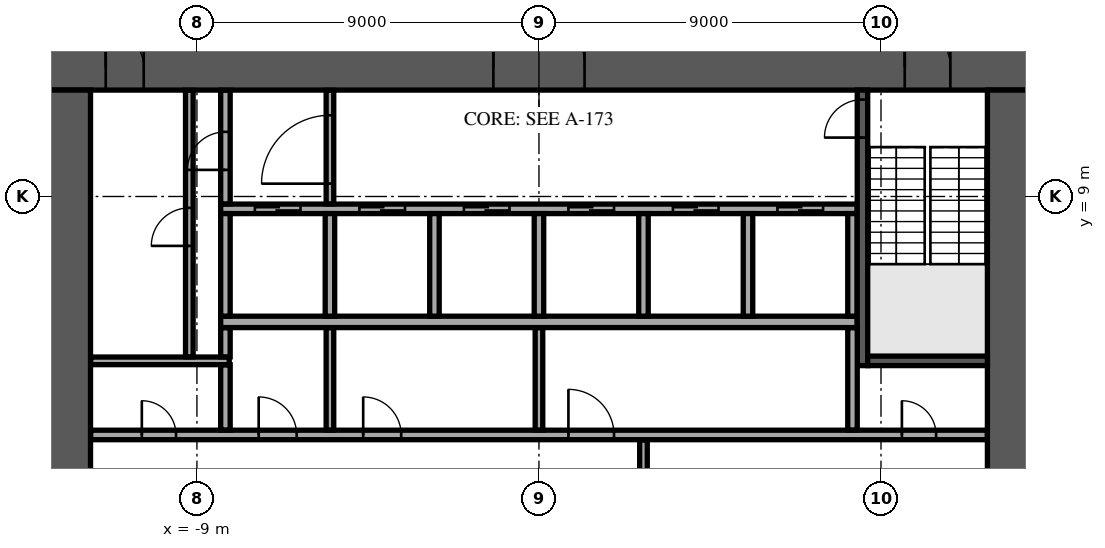
"""IFC4 building model, lengths in metres.
Left out: names, types, materials, properties, quantities, classifications, styles, units other than length and angle.
Written with IfcOpenShell. Run it as: python <this file> out.ifc"""

import sys

from ifc_helpers import new_model, si_unit, direction, frame, frame_2d, origin, place, context, subcontext, project, spatial, rectangle, extrude, element, fill, save


model = new_model("IFC4")
c1 = context("Model", 3, precision=1e-05, world=origin(), true_north=direction((0.0, 1.0)))
c2 = subcontext(c1, "Body", "Model", "MODEL_VIEW")
j1 = project(units=[si_unit("LENGTHUNIT", "METRE"), si_unit("PLANEANGLEUNIT", "RADIAN")], contexts=[c1])
p1 = place(None, origin())
s1 = spatial("IfcSite", under=j1, at=p1, CompositionType="ELEMENT")
p2 = place(p1, origin())
s2 = spatial("IfcBuilding", under=s1, at=p2, CompositionType="ELEMENT")
p3 = place(p2, frame((0.0, 0.0, 68.1)))
s3 = spatial("IfcBuildingStorey", under=s2, at=p3, CompositionType="ELEMENT", Elevation=68.1)
p4 = place(p3, frame((-13.0, 12.4, 0.0), z_axis=(0.0, 0.0, 1.0), x_axis=(1.0, 0.0, 0.0)))
e1 = element("IfcWall", 1, at=p4, inside=s3, PredefinedType="SHEAR", context=c2, shape_type="SweptSolid", body=[
    extrude(rectangle(XDim=26.0, YDim=1.2, at=frame_2d((13.0, 0.0))), origin(), (0.0, 0.0, 1.0), 3.75),
])
p5 = place(p4, frame((11.8, 0.0, 0.0)))
e2 = element("IfcOpeningElement", 2, at=p5, cuts=e1, PredefinedType="OPENING", context=c2, shape_type="SweptSolid", body=[
    extrude(rectangle(XDim=2.4, YDim=2.4, at=frame_2d((1.2, 1.2))), frame((0.0, 0.61, 0.0), z_axis=(0.0, -1.0, 0.0), x_axis=(1.0, 0.0, 0.0)), (0.0, 0.0, 1.0), 1.22),
])
p6 = place(p4, frame((22.625, 0.0, 0.0)))
e3 = element("IfcOpeningElement", 3, at=p6, cuts=e1, PredefinedType="OPENING", context=c2, shape_type="SweptSolid", body=[
    extrude(rectangle(XDim=1.2, YDim=2.1, at=frame_2d((0.6, 1.05))), frame((0.0, 0.61, 0.0), z_axis=(0.0, -1.0, 0.0), x_axis=(1.0, 0.0, 0.0)), (0.0, 0.0, 1.0), 1.22),
])
p7 = place(p4, frame((1.6, 0.0, 0.0)))
e4 = element("IfcOpeningElement", 4, at=p7, cuts=e1, PredefinedType="OPENING", context=c2, shape_type="SweptSolid", body=[
    extrude(rectangle(XDim=1.0, YDim=2.1, at=frame_2d((0.5, 1.05))), frame((0.0, 0.61, 0.0), z_axis=(0.0, -1.0, 0.0), x_axis=(1.0, 0.0, 0.0)), (0.0, 0.0, 1.0), 1.22),
])
p8 = place(p3, frame((12.4, -11.8, 0.0), z_axis=(0.0, 0.0, 1.0), x_axis=(0.0, 1.0, 0.0)))
e5 = element("IfcWall", 5, at=p8, inside=s3, PredefinedType="SHEAR", context=c2, shape_type="SweptSolid", body=[
    extrude(rectangle(XDim=23.6, YDim=1.2, at=frame_2d((11.8, 0.0))), origin(), (0.0, 0.0, 1.0), 3.75),
])
p9 = place(p8, frame((10.6, 0.0, 0.0)))
e6 = element("IfcOpeningElement", 6, at=p9, cuts=e5, PredefinedType="OPENING", context=c2, shape_type="SweptSolid", body=[
    extrude(rectangle(XDim=2.4, YDim=2.4, at=frame_2d((1.2, 1.2))), frame((0.0, 0.61, 0.0), z_axis=(0.0, -1.0, 0.0), x_axis=(1.0, 0.0, 0.0)), (0.0, 0.0, 1.0), 1.22),
])
p10 = place(p3, frame((-12.4, -11.8, 0.0), z_axis=(0.0, 0.0, 1.0), x_axis=(0.0, 1.0, 0.0)))
e7 = element("IfcWall", 7, at=p10, inside=s3, PredefinedType="SHEAR", context=c2, shape_type="SweptSolid", body=[
    extrude(rectangle(XDim=23.6, YDim=1.2, at=frame_2d((11.8, 0.0))), origin(), (0.0, 0.0, 1.0), 3.75),
])
p11 = place(p10, frame((10.6, 0.0, 0.0)))
e8 = element("IfcOpeningElement", 8, at=p11, cuts=e7, PredefinedType="OPENING", context=c2, shape_type="SweptSolid", body=[
    extrude(rectangle(XDim=2.4, YDim=2.4, at=frame_2d((1.2, 1.2))), frame((0.0, 0.61, 0.0), z_axis=(0.0, -1.0, 0.0), x_axis=(1.0, 0.0, 0.0)), (0.0, 0.0, 1.0), 1.22),
])
p12 = place(p3, frame((-8.375, 5.7, 0.0), z_axis=(0.0, 0.0, 1.0), x_axis=(1.0, 0.0, 0.0)))
e9 = element("IfcWall", 9, at=p12, inside=s3, PredefinedType="SOLIDWALL", context=c2, shape_type="SweptSolid", body=[
    extrude(rectangle(XDim=16.75, YDim=0.3, at=frame_2d((8.375, 0.0))), origin(), (0.0, 0.0, 1.0), 3.75),
])
p13 = place(p3, frame((-8.375, 8.675, 0.0), z_axis=(0.0, 0.0, 1.0), x_axis=(1.0, 0.0, 0.0)))
e10 = element("IfcWall", 10, at=p13, inside=s3, PredefinedType="SOLIDWALL", context=c2, shape_type="SweptSolid", body=[
    extrude(rectangle(XDim=16.75, YDim=0.25, at=frame_2d((8.375, 0.0))), origin(), (0.0, 0.0, 1.0), 3.75),
])
p14 = place(p13, frame((0.9, 0.0, 0.0)))
e11 = element("IfcOpeningElement", 11, at=p14, cuts=e10, PredefinedType="OPENING", context=c2, shape_type="SweptSolid", body=[
    extrude(rectangle(XDim=1.2, YDim=2.1, at=frame_2d((0.6, 1.05))), frame((0.0, 0.135, 0.0), z_axis=(0.0, -1.0, 0.0), x_axis=(1.0, 0.0, 0.0)), (0.0, 0.0, 1.0), 0.27),
])
p15 = place(p13, frame((3.65, 0.0, 0.0)))
e12 = element("IfcOpeningElement", 12, at=p15, cuts=e10, PredefinedType="OPENING", context=c2, shape_type="SweptSolid", body=[
    extrude(rectangle(XDim=1.2, YDim=2.1, at=frame_2d((0.6, 1.05))), frame((0.0, 0.135, 0.0), z_axis=(0.0, -1.0, 0.0), x_axis=(1.0, 0.0, 0.0)), (0.0, 0.0, 1.0), 0.27),
])
p16 = place(p13, frame((6.4, 0.0, 0.0)))
e13 = element("IfcOpeningElement", 13, at=p16, cuts=e10, PredefinedType="OPENING", context=c2, shape_type="SweptSolid", body=[
    extrude(rectangle(XDim=1.2, YDim=2.1, at=frame_2d((0.6, 1.05))), frame((0.0, 0.135, 0.0), z_axis=(0.0, -1.0, 0.0), x_axis=(1.0, 0.0, 0.0)), (0.0, 0.0, 1.0), 0.27),
])
p17 = place(p13, frame((9.15, 0.0, 0.0)))
e14 = element("IfcOpeningElement", 14, at=p17, cuts=e10, PredefinedType="OPENING", context=c2, shape_type="SweptSolid", body=[
    extrude(rectangle(XDim=1.2, YDim=2.1, at=frame_2d((0.6, 1.05))), frame((0.0, 0.135, 0.0), z_axis=(0.0, -1.0, 0.0), x_axis=(1.0, 0.0, 0.0)), (0.0, 0.0, 1.0), 0.27),
])
p18 = place(p13, frame((11.9, 0.0, 0.0)))
e15 = element("IfcOpeningElement", 15, at=p18, cuts=e10, PredefinedType="OPENING", context=c2, shape_type="SweptSolid", body=[
    extrude(rectangle(XDim=1.2, YDim=2.1, at=frame_2d((0.6, 1.05))), frame((0.0, 0.135, 0.0), z_axis=(0.0, -1.0, 0.0), x_axis=(1.0, 0.0, 0.0)), (0.0, 0.0, 1.0), 0.27),
])
p19 = place(p13, frame((14.65, 0.0, 0.0)))
e16 = element("IfcOpeningElement", 16, at=p19, cuts=e10, PredefinedType="OPENING", context=c2, shape_type="SweptSolid", body=[
    extrude(rectangle(XDim=1.2, YDim=2.1, at=frame_2d((0.6, 1.05))), frame((0.0, 0.135, 0.0), z_axis=(0.0, -1.0, 0.0), x_axis=(1.0, 0.0, 0.0)), (0.0, 0.0, 1.0), 0.27),
])
for number, where, z_axis, x_axis in (
    (17, (-8.25, 5.85, 0.0), (0.0, 0.0, 1.0), (0.0, 1.0, 0.0)),
    (18, (-5.5, 5.85, 0.0), (0.0, 0.0, 1.0), (0.0, 1.0, 0.0)),
    (19, (-2.75, 5.85, 0.0), (0.0, 0.0, 1.0), (0.0, 1.0, 0.0)),
    (20, (0.0, 5.85, 0.0), (0.0, 0.0, 1.0), (0.0, 1.0, 0.0)),
    (21, (2.75, 5.85, 0.0), (0.0, 0.0, 1.0), (0.0, 1.0, 0.0)),
    (22, (5.5, 5.85, 0.0), (0.0, 0.0, 1.0), (0.0, 1.0, 0.0)),
    (23, (8.25, 5.85, 0.0), (0.0, 0.0, 1.0), (0.0, 1.0, 0.0)),
):
    element("IfcWall", number, at=place(p3, frame(where, z_axis=z_axis, x_axis=x_axis)), inside=s3, PredefinedType="SOLIDWALL", context=c2, shape_type="SweptSolid", body=[
        extrude(rectangle(XDim=2.7, YDim=0.25, at=frame_2d((1.35, 0.0))), origin(), (0.0, 0.0, 1.0), 3.75),
    ])
p20 = place(p3, frame((8.512, 4.55, 0.0), z_axis=(0.0, 0.0, 1.0), x_axis=(0.0, 1.0, 0.0)))
e24 = element("IfcWall", 24, at=p20, inside=s3, PredefinedType="SOLIDWALL", context=c2, shape_type="SweptSolid", body=[
    extrude(rectangle(XDim=7.25, YDim=0.275, at=frame_2d((3.625, 0.0))), origin(), (0.0, 0.0, 1.0), 3.75),
])
p21 = place(p20, frame((6.0, 0.0, 0.0)))
e25 = element("IfcOpeningElement", 25, at=p21, cuts=e24, PredefinedType="OPENING", context=c2, shape_type="SweptSolid", body=[
    extrude(rectangle(XDim=1.0, YDim=2.1, at=frame_2d((0.5, 1.05))), frame((0.0, 0.147, 0.0), z_axis=(0.0, -1.0, 0.0), x_axis=(1.0, 0.0, 0.0)), (0.0, 0.0, 1.0), 0.295),
])
p22 = place(p3, frame((8.65, 4.675, 0.0), z_axis=(0.0, 0.0, 1.0), x_axis=(1.0, 0.0, 0.0)))
e26 = element("IfcWall", 26, at=p22, inside=s3, PredefinedType="SOLIDWALL", context=c2, shape_type="SweptSolid", body=[
    extrude(rectangle(XDim=3.15, YDim=0.25, at=frame_2d((1.575, 0.0))), origin(), (0.0, 0.0, 1.0), 3.75),
])
p23 = place(p3, frame((2.75, -2.595, 0.0), z_axis=(0.0, 0.0, 1.0), x_axis=(0.0, 1.0, 0.0)))
e27 = element("IfcWall", 27, at=p23, inside=s3, PredefinedType="PARTITIONING", context=c2, shape_type="SweptSolid", body=[
    extrude(rectangle(XDim=5.19, YDim=0.2, at=frame_2d((2.595, 0.0))), origin(), (0.0, 0.0, 1.0), 3.75),
])
p24 = place(p23, frame((1.395, 0.0, 0.0)))
e28 = element("IfcOpeningElement", 28, at=p24, cuts=e27, PredefinedType="OPENING", context=c2, shape_type="SweptSolid", body=[
    extrude(rectangle(XDim=2.4, YDim=2.4, at=frame_2d((1.2, 1.2))), frame((0.0, 0.11, 0.0), z_axis=(0.0, -1.0, 0.0), x_axis=(1.0, 0.0, 0.0)), (0.0, 0.0, 1.0), 0.22),
])
p25 = place(p3, frame((-11.795, 2.725, 0.0), z_axis=(0.0, 0.0, 1.0), x_axis=(1.0, 0.0, 0.0)))
e29 = element("IfcWall", 29, at=p25, inside=s3, PredefinedType="PARTITIONING", context=c2, shape_type="SweptSolid", body=[
    extrude(rectangle(XDim=23.59, YDim=0.25, at=frame_2d((11.795, 0.0))), origin(), (0.0, 0.0, 1.0), 3.75),
])
p26 = place(p25, frame((21.345, 0.0, 0.0)))
e30 = element("IfcOpeningElement", 30, at=p26, cuts=e29, PredefinedType="OPENING", context=c2, shape_type="SweptSolid", body=[
    extrude(rectangle(XDim=0.9, YDim=2.1, at=frame_2d((0.45, 1.05))), frame((0.0, 0.135, 0.0), z_axis=(0.0, -1.0, 0.0), x_axis=(1.0, 0.0, 0.0)), (0.0, 0.0, 1.0), 0.27),
])
p27 = place(p25, frame((1.345, 0.0, 0.0)))
e31 = element("IfcOpeningElement", 31, at=p27, cuts=e29, PredefinedType="OPENING", context=c2, shape_type="SweptSolid", body=[
    extrude(rectangle(XDim=0.9, YDim=2.1, at=frame_2d((0.45, 1.05))), frame((0.0, 0.135, 0.0), z_axis=(0.0, -1.0, 0.0), x_axis=(1.0, 0.0, 0.0)), (0.0, 0.0, 1.0), 0.27),
])
p28 = place(p25, frame((4.42, 0.0, 0.0)))
e32 = element("IfcOpeningElement", 32, at=p28, cuts=e29, PredefinedType="OPENING", context=c2, shape_type="SweptSolid", body=[
    extrude(rectangle(XDim=1.0, YDim=2.1, at=frame_2d((0.5, 1.05))), frame((0.0, 0.135, 0.0), z_axis=(0.0, -1.0, 0.0), x_axis=(1.0, 0.0, 0.0)), (0.0, 0.0, 1.0), 0.27),
])
p29 = place(p25, frame((7.17, 0.0, 0.0)))
e33 = element("IfcOpeningElement", 33, at=p29, cuts=e29, PredefinedType="OPENING", context=c2, shape_type="SweptSolid", body=[
    extrude(rectangle(XDim=1.0, YDim=2.1, at=frame_2d((0.5, 1.05))), frame((0.0, 0.135, 0.0), z_axis=(0.0, -1.0, 0.0), x_axis=(1.0, 0.0, 0.0)), (0.0, 0.0, 1.0), 0.27),
])
p30 = place(p25, frame((12.57, 0.0, 0.0)))
e34 = element("IfcOpeningElement", 34, at=p30, cuts=e29, PredefinedType="OPENING", context=c2, shape_type="SweptSolid", body=[
    extrude(rectangle(XDim=1.2, YDim=2.1, at=frame_2d((0.6, 1.05))), frame((0.0, 0.135, 0.0), z_axis=(0.0, -1.0, 0.0), x_axis=(1.0, 0.0, 0.0)), (0.0, 0.0, 1.0), 0.27),
])
p31 = place(p3, frame((-8.25, 2.855, 0.0), z_axis=(0.0, 0.0, 1.0), x_axis=(0.0, 1.0, 0.0)))
e35 = element("IfcWall", 35, at=p31, inside=s3, PredefinedType="PARTITIONING", context=c2, shape_type="SweptSolid", body=[
    extrude(rectangle(XDim=1.715, YDim=0.25, at=frame_2d((0.857, 0.0))), origin(), (0.0, 0.0, 1.0), 3.75),
])
for number, where, z_axis, x_axis in (
    (36, (-5.5, 2.855, 0.0), (0.0, 0.0, 1.0), (0.0, 1.0, 0.0)),
    (37, (0.0, 2.855, 0.0), (0.0, 0.0, 1.0), (0.0, 1.0, 0.0)),
):
    element("IfcWall", number, at=place(p3, frame(where, z_axis=z_axis, x_axis=x_axis)), inside=s3, PredefinedType="PARTITIONING", context=c2, shape_type="SweptSolid", body=[
        extrude(rectangle(XDim=2.69, YDim=0.2, at=frame_2d((1.345, 0.0))), origin(), (0.0, 0.0, 1.0), 3.75),
    ])
p32 = place(p3, frame((8.25, 2.855, 0.0), z_axis=(0.0, 0.0, 1.0), x_axis=(0.0, 1.0, 0.0)))
e38 = element("IfcWall", 38, at=p32, inside=s3, PredefinedType="PARTITIONING", context=c2, shape_type="SweptSolid", body=[
    extrude(rectangle(XDim=2.69, YDim=0.25, at=frame_2d((1.345, 0.0))), origin(), (0.0, 0.0, 1.0), 3.75),
])
p33 = place(p3, frame((-11.795, 4.675, 0.0), z_axis=(0.0, 0.0, 1.0), x_axis=(1.0, 0.0, 0.0)))
e39 = element("IfcWall", 39, at=p33, inside=s3, PredefinedType="PARTITIONING", context=c2, shape_type="SweptSolid", body=[
    extrude(rectangle(XDim=3.645, YDim=0.2, at=frame_2d((1.823, 0.0))), origin(), (0.0, 0.0, 1.0), 3.75),
])
p34 = place(p3, frame((-9.2, 4.78, 0.0), z_axis=(0.0, 0.0, 1.0), x_axis=(0.0, 1.0, 0.0)))
e40 = element("IfcWall", 40, at=p34, inside=s3, PredefinedType="PARTITIONING", context=c2, shape_type="SweptSolid", body=[
    extrude(rectangle(XDim=7.015, YDim=0.2, at=frame_2d((3.507, 0.0))), origin(), (0.0, 0.0, 1.0), 3.75),
])
p35 = place(p34, frame((2.92, 0.0, 0.0)))
e41 = element("IfcOpeningElement", 41, at=p35, cuts=e40, PredefinedType="OPENING", context=c2, shape_type="SweptSolid", body=[
    extrude(rectangle(XDim=1.0, YDim=2.1, at=frame_2d((0.5, 1.05))), frame((0.0, 0.11, 0.0), z_axis=(0.0, -1.0, 0.0), x_axis=(1.0, 0.0, 0.0)), (0.0, 0.0, 1.0), 0.22),
])
p36 = place(p3, frame((-8.25, 4.78, 0.0), z_axis=(0.0, 0.0, 1.0), x_axis=(0.0, 1.0, 0.0)))
e42 = element("IfcWall", 42, at=p36, inside=s3, PredefinedType="PARTITIONING", context=c2, shape_type="SweptSolid", body=[
    extrude(rectangle(XDim=0.765, YDim=0.25, at=frame_2d((0.382, 0.0))), origin(), (0.0, 0.0, 1.0), 3.75),
])
p37 = place(p3, frame((-8.25, 8.805, 0.0), z_axis=(0.0, 0.0, 1.0), x_axis=(0.0, 1.0, 0.0)))
e43 = element("IfcWall", 43, at=p37, inside=s3, PredefinedType="PARTITIONING", context=c2, shape_type="SweptSolid", body=[
    extrude(rectangle(XDim=2.99, YDim=0.25, at=frame_2d((1.495, 0.0))), origin(), (0.0, 0.0, 1.0), 3.75),
])
p38 = place(p37, frame((0.895, 0.0, 0.0)))
e44 = element("IfcOpeningElement", 44, at=p38, cuts=e43, PredefinedType="OPENING", context=c2, shape_type="SweptSolid", body=[
    extrude(rectangle(XDim=1.0, YDim=2.1, at=frame_2d((0.5, 1.05))), frame((0.0, 0.135, 0.0), z_axis=(0.0, -1.0, 0.0), x_axis=(1.0, 0.0, 0.0)), (0.0, 0.0, 1.0), 0.27),
])
p39 = place(p3, frame((-5.5, 8.805, 0.0), z_axis=(0.0, 0.0, 1.0), x_axis=(0.0, 1.0, 0.0)))
e45 = element("IfcWall", 45, at=p39, inside=s3, PredefinedType="PARTITIONING", context=c2, shape_type="SweptSolid", body=[
    extrude(rectangle(XDim=2.99, YDim=0.2, at=frame_2d((1.495, 0.0))), origin(), (0.0, 0.0, 1.0), 3.75),
])
p40 = place(p39, frame((0.532, 0.0, 0.0)))
e46 = element("IfcOpeningElement", 46, at=p40, cuts=e45, PredefinedType="OPENING", context=c2, shape_type="SweptSolid", body=[
    extrude(rectangle(XDim=1.8, YDim=2.1, at=frame_2d((0.9, 1.05))), frame((0.0, 0.11, 0.0), z_axis=(0.0, -1.0, 0.0), x_axis=(1.0, 0.0, 0.0)), (0.0, 0.0, 1.0), 0.22),
])
p41 = place(p5, origin())
e47 = element("IfcDoor", 47, at=p41, inside=s3, OperationType="SINGLE_SWING_LEFT", PredefinedType="DOOR", context=c2, shape_type="SweptSolid", body=[
    extrude(rectangle(XDim=2.4, YDim=2.4, at=frame_2d((1.2, 1.2))), frame((0.0, 0.025, 0.0), z_axis=(0.0, -1.0, 0.0), x_axis=(1.0, 0.0, 0.0)), (0.0, 0.0, 1.0), 0.05),
])
fill(e2, e47)
p42 = place(p6, origin())
e48 = element("IfcDoor", 48, at=p42, inside=s3, OperationType="SINGLE_SWING_LEFT", PredefinedType="DOOR", context=c2, shape_type="SweptSolid", body=[
    extrude(rectangle(XDim=1.2, YDim=2.1, at=frame_2d((0.6, 1.05))), frame((0.0, 0.025, 0.0), z_axis=(0.0, -1.0, 0.0), x_axis=(1.0, 0.0, 0.0)), (0.0, 0.0, 1.0), 0.05),
])
fill(e3, e48)
p43 = place(p7, origin())
e49 = element("IfcDoor", 49, at=p43, inside=s3, OperationType="SINGLE_SWING_LEFT", PredefinedType="DOOR", context=c2, shape_type="SweptSolid", body=[
    extrude(rectangle(XDim=1.0, YDim=2.1, at=frame_2d((0.5, 1.05))), frame((0.0, 0.025, 0.0), z_axis=(0.0, -1.0, 0.0), x_axis=(1.0, 0.0, 0.0)), (0.0, 0.0, 1.0), 0.05),
])
fill(e4, e49)
p44 = place(p14, origin())
e50 = element("IfcDoor", 50, at=p44, inside=s3, OperationType="DOUBLE_DOOR_SLIDING", PredefinedType="DOOR", context=c2, shape_type="SweptSolid", body=[
    extrude(rectangle(XDim=1.2, YDim=2.1, at=frame_2d((0.6, 1.05))), frame((0.0, 0.025, 0.0), z_axis=(0.0, -1.0, 0.0), x_axis=(1.0, 0.0, 0.0)), (0.0, 0.0, 1.0), 0.05),
])
fill(e11, e50)
p45 = place(p15, origin())
e51 = element("IfcDoor", 51, at=p45, inside=s3, OperationType="DOUBLE_DOOR_SLIDING", PredefinedType="DOOR", context=c2, shape_type="SweptSolid", body=[
    extrude(rectangle(XDim=1.2, YDim=2.1, at=frame_2d((0.6, 1.05))), frame((0.0, 0.025, 0.0), z_axis=(0.0, -1.0, 0.0), x_axis=(1.0, 0.0, 0.0)), (0.0, 0.0, 1.0), 0.05),
])
fill(e12, e51)
p46 = place(p16, origin())
e52 = element("IfcDoor", 52, at=p46, inside=s3, OperationType="DOUBLE_DOOR_SLIDING", PredefinedType="DOOR", context=c2, shape_type="SweptSolid", body=[
    extrude(rectangle(XDim=1.2, YDim=2.1, at=frame_2d((0.6, 1.05))), frame((0.0, 0.025, 0.0), z_axis=(0.0, -1.0, 0.0), x_axis=(1.0, 0.0, 0.0)), (0.0, 0.0, 1.0), 0.05),
])
fill(e13, e52)
p47 = place(p17, origin())
e53 = element("IfcDoor", 53, at=p47, inside=s3, OperationType="DOUBLE_DOOR_SLIDING", PredefinedType="DOOR", context=c2, shape_type="SweptSolid", body=[
    extrude(rectangle(XDim=1.2, YDim=2.1, at=frame_2d((0.6, 1.05))), frame((0.0, 0.025, 0.0), z_axis=(0.0, -1.0, 0.0), x_axis=(1.0, 0.0, 0.0)), (0.0, 0.0, 1.0), 0.05),
])
fill(e14, e53)
p48 = place(p18, origin())
e54 = element("IfcDoor", 54, at=p48, inside=s3, OperationType="DOUBLE_DOOR_SLIDING", PredefinedType="DOOR", context=c2, shape_type="SweptSolid", body=[
    extrude(rectangle(XDim=1.2, YDim=2.1, at=frame_2d((0.6, 1.05))), frame((0.0, 0.025, 0.0), z_axis=(0.0, -1.0, 0.0), x_axis=(1.0, 0.0, 0.0)), (0.0, 0.0, 1.0), 0.05),
])
fill(e15, e54)
p49 = place(p19, origin())
e55 = element("IfcDoor", 55, at=p49, inside=s3, OperationType="DOUBLE_DOOR_SLIDING", PredefinedType="DOOR", context=c2, shape_type="SweptSolid", body=[
    extrude(rectangle(XDim=1.2, YDim=2.1, at=frame_2d((0.6, 1.05))), frame((0.0, 0.025, 0.0), z_axis=(0.0, -1.0, 0.0), x_axis=(1.0, 0.0, 0.0)), (0.0, 0.0, 1.0), 0.05),
])
fill(e16, e55)
p50 = place(p21, origin())
e56 = element("IfcDoor", 56, at=p50, inside=s3, OperationType="SINGLE_SWING_LEFT", PredefinedType="DOOR", context=c2, shape_type="SweptSolid", body=[
    extrude(rectangle(XDim=1.0, YDim=2.1, at=frame_2d((0.5, 1.05))), frame((0.0, 0.025, 0.0), z_axis=(0.0, -1.0, 0.0), x_axis=(1.0, 0.0, 0.0)), (0.0, 0.0, 1.0), 0.05),
])
fill(e25, e56)
p51 = place(p26, origin())
e57 = element("IfcDoor", 57, at=p51, inside=s3, OperationType="SINGLE_SWING_RIGHT", PredefinedType="DOOR", context=c2, shape_type="SweptSolid", body=[
    extrude(rectangle(XDim=0.9, YDim=2.1, at=frame_2d((0.45, 1.05))), frame((0.0, 0.025, 0.0), z_axis=(0.0, -1.0, 0.0), x_axis=(1.0, 0.0, 0.0)), (0.0, 0.0, 1.0), 0.05),
])
fill(e30, e57)
p52 = place(p27, origin())
e58 = element("IfcDoor", 58, at=p52, inside=s3, OperationType="SINGLE_SWING_RIGHT", PredefinedType="DOOR", context=c2, shape_type="SweptSolid", body=[
    extrude(rectangle(XDim=0.9, YDim=2.1, at=frame_2d((0.45, 1.05))), frame((0.0, 0.025, 0.0), z_axis=(0.0, -1.0, 0.0), x_axis=(1.0, 0.0, 0.0)), (0.0, 0.0, 1.0), 0.05),
])
fill(e31, e58)
p53 = place(p35, origin())
e59 = element("IfcDoor", 59, at=p53, inside=s3, OperationType="SINGLE_SWING_RIGHT", PredefinedType="DOOR", context=c2, shape_type="SweptSolid", body=[
    extrude(rectangle(XDim=1.0, YDim=2.1, at=frame_2d((0.5, 1.05))), frame((0.0, 0.025, 0.0), z_axis=(0.0, -1.0, 0.0), x_axis=(1.0, 0.0, 0.0)), (0.0, 0.0, 1.0), 0.05),
])
fill(e41, e59)
p54 = place(p38, origin())
e60 = element("IfcDoor", 60, at=p54, inside=s3, OperationType="SINGLE_SWING_RIGHT", PredefinedType="DOOR", context=c2, shape_type="SweptSolid", body=[
    extrude(rectangle(XDim=1.0, YDim=2.1, at=frame_2d((0.5, 1.05))), frame((0.0, 0.025, 0.0), z_axis=(0.0, -1.0, 0.0), x_axis=(1.0, 0.0, 0.0)), (0.0, 0.0, 1.0), 0.05),
])
fill(e44, e60)
p55 = place(p28, origin())
e61 = element("IfcDoor", 61, at=p55, inside=s3, OperationType="SINGLE_SWING_RIGHT", PredefinedType="DOOR", context=c2, shape_type="SweptSolid", body=[
    extrude(rectangle(XDim=1.0, YDim=2.1, at=frame_2d((0.5, 1.05))), frame((0.0, 0.025, 0.0), z_axis=(0.0, -1.0, 0.0), x_axis=(1.0, 0.0, 0.0)), (0.0, 0.0, 1.0), 0.05),
])
fill(e32, e61)
p56 = place(p29, origin())
e62 = element("IfcDoor", 62, at=p56, inside=s3, OperationType="SINGLE_SWING_RIGHT", PredefinedType="DOOR", context=c2, shape_type="SweptSolid", body=[
    extrude(rectangle(XDim=1.0, YDim=2.1, at=frame_2d((0.5, 1.05))), frame((0.0, 0.025, 0.0), z_axis=(0.0, -1.0, 0.0), x_axis=(1.0, 0.0, 0.0)), (0.0, 0.0, 1.0), 0.05),
])
fill(e33, e62)
p57 = place(p30, origin())
e63 = element("IfcDoor", 63, at=p57, inside=s3, OperationType="SINGLE_SWING_LEFT", PredefinedType="DOOR", context=c2, shape_type="SweptSolid", body=[
    extrude(rectangle(XDim=1.2, YDim=2.1, at=frame_2d((0.6, 1.05))), frame((0.0, 0.025, 0.0), z_axis=(0.0, -1.0, 0.0), x_axis=(1.0, 0.0, 0.0)), (0.0, 0.0, 1.0), 0.05),
])
fill(e34, e63)
p58 = place(p40, origin())
e64 = element("IfcDoor", 64, at=p58, inside=s3, OperationType="SINGLE_SWING_LEFT", PredefinedType="DOOR", context=c2, shape_type="SweptSolid", body=[
    extrude(rectangle(XDim=1.8, YDim=2.1, at=frame_2d((0.9, 1.05))), frame((0.0, 0.025, 0.0), z_axis=(0.0, -1.0, 0.0), x_axis=(1.0, 0.0, 0.0)), (0.0, 0.0, 1.0), 0.05),
])
fill(e46, e64)
save(model, sys.argv[1])
